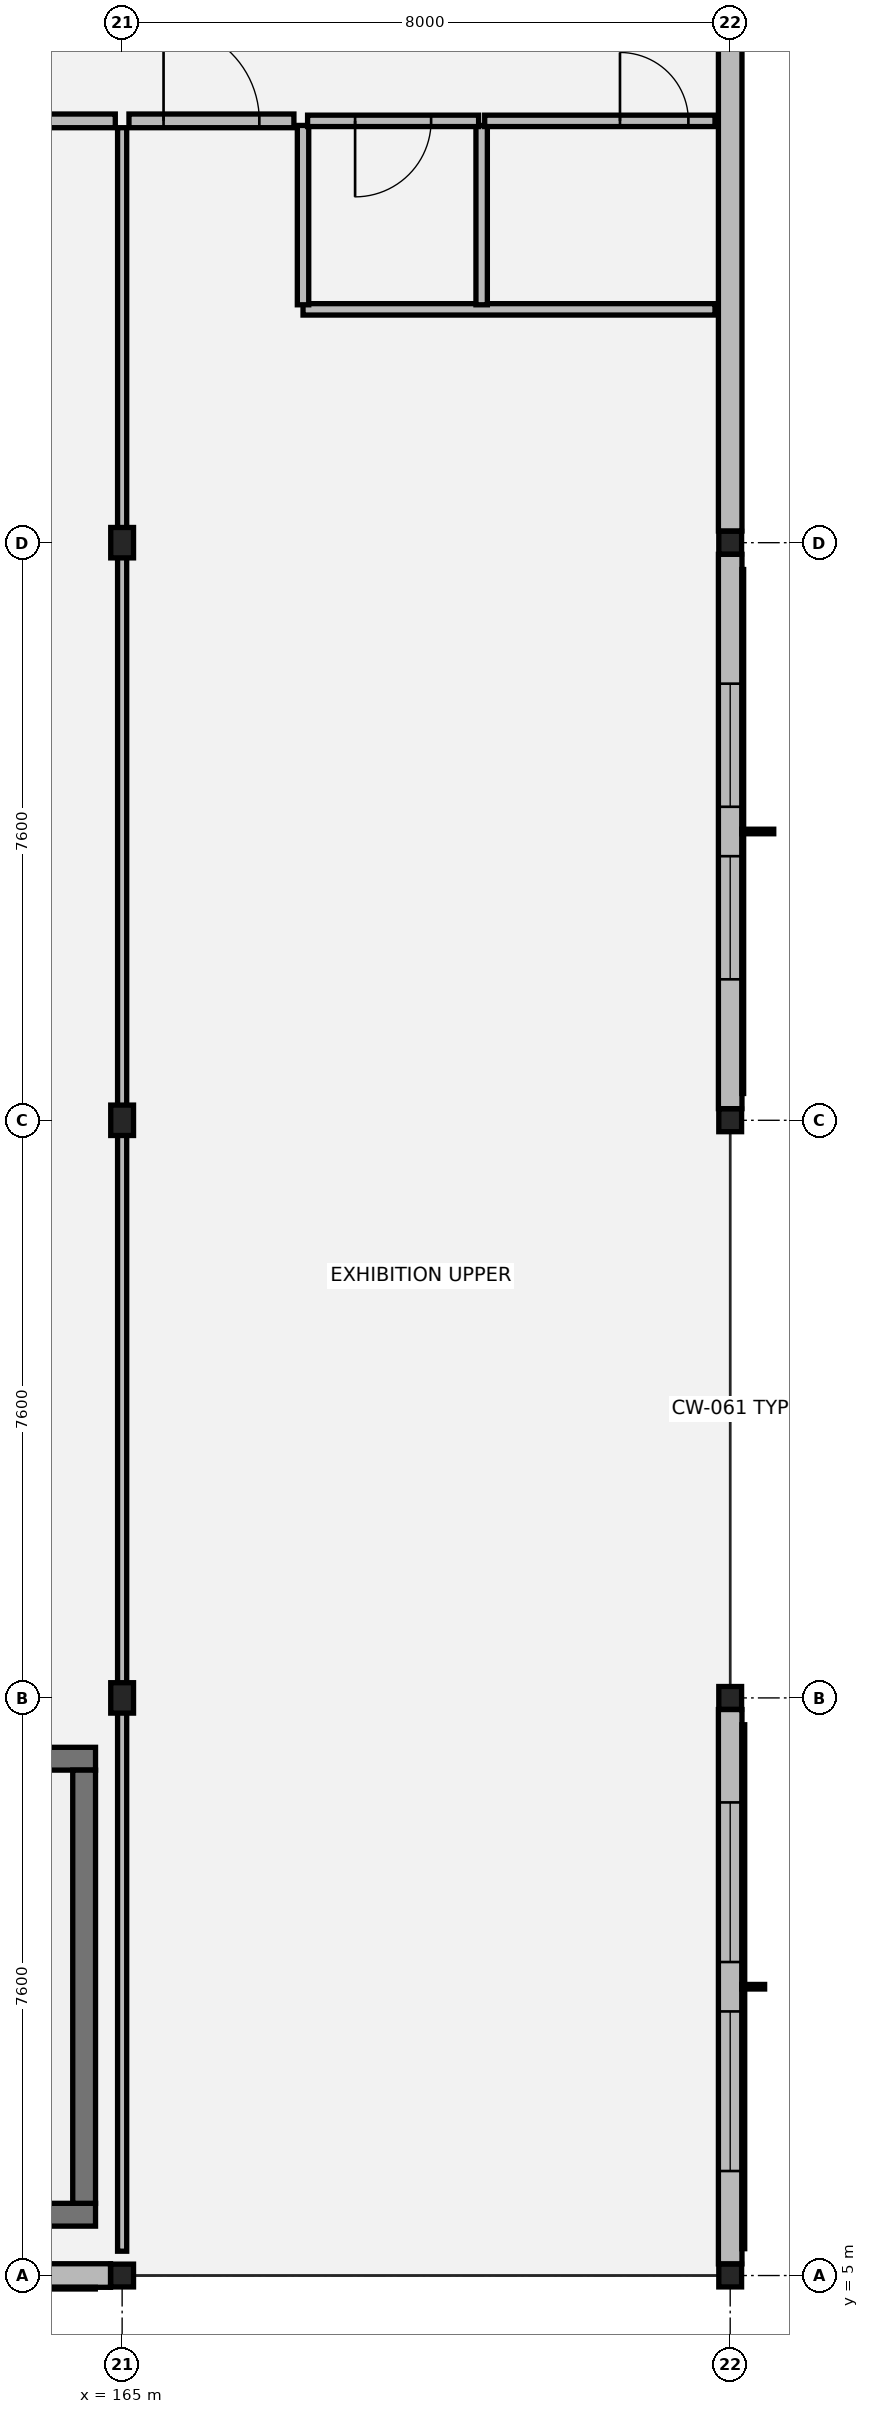
"""IFC4 building model, lengths in metres.
Left out: names, types, materials, properties, quantities, classifications, styles, units other than length and angle.
Written with IfcOpenShell. Run it as: python <this file> out.ifc"""

import sys

from ifc_helpers import new_model, si_unit, direction, frame, frame_2d, origin, origin_2d, place, context, subcontext, project, spatial, rectangle, hollow_rectangle, i_section, extrude, element, fill, save


model = new_model("IFC4")
c1 = context("Model", 3, precision=1e-05, world=origin(), true_north=direction((0.0, 1.0)))
c2 = subcontext(c1, "Body", "Model", "MODEL_VIEW")
j1 = project(units=[si_unit("LENGTHUNIT", "METRE"), si_unit("PLANEANGLEUNIT", "RADIAN")], contexts=[c1])
p1 = place(None, origin())
s1 = spatial("IfcSite", under=j1, at=p1, CompositionType="ELEMENT")
p2 = place(p1, origin())
s2 = spatial("IfcBuilding", under=s1, at=p2, CompositionType="ELEMENT")
p3 = place(p2, frame((0.0, 0.0, 5.1)))
s3 = spatial("IfcBuildingStorey", under=s2, at=p3, CompositionType="ELEMENT", Elevation=5.1)
p4 = place(p3, frame((165.0, 5.0, 0.0), z_axis=(0.0, 0.0, 1.0), x_axis=(1.0, 0.0, 0.0)))
e1 = element("IfcColumn", 1, at=p4, inside=s3, PredefinedType="COLUMN", context=c2, shape_type="SweptSolid", body=[
    extrude(hollow_rectangle(XDim=0.3, YDim=0.3, WallThickness=0.012, at=origin_2d()), origin(), (0.0, 0.0, 1.0), 4.055),
])
for number, where, z_axis, x_axis in (
    (2, (165.0, 12.6, 0.0), (0.0, 0.0, 1.0), (1.0, 0.0, 0.0)),
    (3, (165.0, 20.2, 0.0), (0.0, 0.0, 1.0), (1.0, 0.0, 0.0)),
    (4, (165.0, 27.8, 0.0), (0.0, 0.0, 1.0), (1.0, 0.0, 0.0)),
):
    element("IfcColumn", number, at=place(p3, frame(where, z_axis=z_axis, x_axis=x_axis)), inside=s3, PredefinedType="COLUMN", context=c2, shape_type="SweptSolid", body=[
        extrude(i_section(OverallWidth=0.3, OverallDepth=0.4, WebThickness=0.013, FlangeThickness=0.024, at=origin_2d()), origin(), (0.0, 0.0, 1.0), 4.055),
    ])
for number, where, z_axis, x_axis in (
    (5, (173.0, 5.0, 0.0), (0.0, 0.0, 1.0), (1.0, 0.0, 0.0)),
    (6, (173.0, 12.6, 0.0), (0.0, 0.0, 1.0), (1.0, 0.0, 0.0)),
    (7, (173.0, 20.2, 0.0), (0.0, 0.0, 1.0), (1.0, 0.0, 0.0)),
    (8, (173.0, 27.8, 0.0), (0.0, 0.0, 1.0), (1.0, 0.0, 0.0)),
):
    element("IfcColumn", number, at=place(p3, frame(where, z_axis=z_axis, x_axis=x_axis)), inside=s3, PredefinedType="COLUMN", context=c2, shape_type="SweptSolid", body=[
        extrude(hollow_rectangle(XDim=0.3, YDim=0.3, WallThickness=0.012, at=origin_2d()), origin(), (0.0, 0.0, 1.0), 4.055),
    ])
p5 = place(p3, frame((157.153, 5.0, 0.0), z_axis=(0.0, 0.0, 1.0), x_axis=(1.0, 0.0, 0.0)))
e9 = element("IfcWall", 9, at=p5, inside=s3, PredefinedType="SOLIDWALL", context=c2, shape_type="SweptSolid", body=[
    extrude(rectangle(XDim=7.694, YDim=0.31, at=frame_2d((3.847, 0.0))), origin(), (0.0, 0.0, 1.0), 3.48),
])
p6 = place(p5, frame((1.902, 0.0, 0.8)))
e10 = element("IfcOpeningElement", 10, at=p6, cuts=e9, PredefinedType="OPENING", context=c2, shape_type="SweptSolid", body=[
    extrude(rectangle(XDim=1.62, YDim=2.06, at=frame_2d((0.81, 1.03))), frame((0.0, 0.165, 0.0), z_axis=(0.0, -1.0, 0.0), x_axis=(1.0, 0.0, 0.0)), (0.0, 0.0, 1.0), 0.33),
])
p7 = place(p5, frame((4.172, 0.0, 0.8)))
e11 = element("IfcOpeningElement", 11, at=p7, cuts=e9, PredefinedType="OPENING", context=c2, shape_type="SweptSolid", body=[
    extrude(rectangle(XDim=1.62, YDim=2.06, at=frame_2d((0.81, 1.03))), frame((0.0, 0.165, 0.0), z_axis=(0.0, -1.0, 0.0), x_axis=(1.0, 0.0, 0.0)), (0.0, 0.0, 1.0), 0.33),
])
p8 = place(p3, frame((173.0, 5.153, 0.0), z_axis=(0.0, 0.0, 1.0), x_axis=(0.0, 1.0, 0.0)))
e12 = element("IfcWall", 12, at=p8, inside=s3, PredefinedType="SOLIDWALL", context=c2, shape_type="SweptSolid", body=[
    extrude(rectangle(XDim=7.294, YDim=0.31, at=frame_2d((3.647, 0.0))), origin(), (0.0, 0.0, 1.0), 3.48),
])
p9 = place(p8, frame((1.222, 0.0, 0.8)))
e13 = element("IfcOpeningElement", 13, at=p9, cuts=e12, PredefinedType="OPENING", context=c2, shape_type="SweptSolid", body=[
    extrude(rectangle(XDim=2.1, YDim=2.25, at=frame_2d((1.05, 1.125))), frame((0.0, 0.165, 0.0), z_axis=(0.0, -1.0, 0.0), x_axis=(1.0, 0.0, 0.0)), (0.0, 0.0, 1.0), 0.33),
])
p10 = place(p8, frame((3.972, 0.0, 0.8)))
e14 = element("IfcOpeningElement", 14, at=p10, cuts=e12, PredefinedType="OPENING", context=c2, shape_type="SweptSolid", body=[
    extrude(rectangle(XDim=2.1, YDim=2.25, at=frame_2d((1.05, 1.125))), frame((0.0, 0.165, 0.0), z_axis=(0.0, -1.0, 0.0), x_axis=(1.0, 0.0, 0.0)), (0.0, 0.0, 1.0), 0.33),
])
p11 = place(p3, frame((173.0, 20.353, 0.0), z_axis=(0.0, 0.0, 1.0), x_axis=(0.0, 1.0, 0.0)))
e15 = element("IfcWall", 15, at=p11, inside=s3, PredefinedType="SOLIDWALL", context=c2, shape_type="SweptSolid", body=[
    extrude(rectangle(XDim=7.294, YDim=0.31, at=frame_2d((3.647, 0.0))), origin(), (0.0, 0.0, 1.0), 3.48),
])
p12 = place(p11, frame((1.702, 0.0, 0.8)))
e16 = element("IfcOpeningElement", 16, at=p12, cuts=e15, PredefinedType="OPENING", context=c2, shape_type="SweptSolid", body=[
    extrude(rectangle(XDim=1.62, YDim=2.06, at=frame_2d((0.81, 1.03))), frame((0.0, 0.165, 0.0), z_axis=(0.0, -1.0, 0.0), x_axis=(1.0, 0.0, 0.0)), (0.0, 0.0, 1.0), 0.33),
])
p13 = place(p11, frame((3.972, 0.0, 0.8)))
e17 = element("IfcOpeningElement", 17, at=p13, cuts=e15, PredefinedType="OPENING", context=c2, shape_type="SweptSolid", body=[
    extrude(rectangle(XDim=1.62, YDim=2.06, at=frame_2d((0.81, 1.03))), frame((0.0, 0.165, 0.0), z_axis=(0.0, -1.0, 0.0), x_axis=(1.0, 0.0, 0.0)), (0.0, 0.0, 1.0), 0.33),
])
p14 = place(p3, frame((173.0, 27.953, 0.0), z_axis=(0.0, 0.0, 1.0), x_axis=(0.0, 1.0, 0.0)))
e18 = element("IfcWall", 18, at=p14, inside=s3, PredefinedType="SOLIDWALL", context=c2, shape_type="SweptSolid", body=[
    extrude(rectangle(XDim=7.294, YDim=0.31, at=frame_2d((3.647, 0.0))), origin(), (0.0, 0.0, 1.0), 3.48),
])
p15 = place(p3, frame((157.35, 5.8, 0.0), z_axis=(0.0, 0.0, 1.0), x_axis=(1.0, 0.0, 0.0)))
e19 = element("IfcWall", 19, at=p15, inside=s3, PredefinedType="SHEAR", context=c2, shape_type="SweptSolid", body=[
    extrude(rectangle(XDim=7.3, YDim=0.3, at=frame_2d((3.65, 0.0))), origin(), (0.0, 0.0, 1.0), 3.845),
])
p16 = place(p3, frame((157.35, 11.8, 0.0), z_axis=(0.0, 0.0, 1.0), x_axis=(1.0, 0.0, 0.0)))
e20 = element("IfcWall", 20, at=p16, inside=s3, PredefinedType="SHEAR", context=c2, shape_type="SweptSolid", body=[
    extrude(rectangle(XDim=7.3, YDim=0.3, at=frame_2d((3.65, 0.0))), origin(), (0.0, 0.0, 1.0), 3.845),
])
p17 = place(p16, frame((0.33, 0.0, 0.0)))
e21 = element("IfcOpeningElement", 21, at=p17, cuts=e20, PredefinedType="OPENING", context=c2, shape_type="SweptSolid", body=[
    extrude(rectangle(XDim=1.18, YDim=2.18, at=frame_2d((0.59, 1.09))), frame((0.0, 0.16, 0.0), z_axis=(0.0, -1.0, 0.0), x_axis=(1.0, 0.0, 0.0)), (0.0, 0.0, 1.0), 0.32),
])
p18 = place(p3, frame((164.5, 5.95, 0.0), z_axis=(0.0, 0.0, 1.0), x_axis=(0.0, 1.0, 0.0)))
e22 = element("IfcWall", 22, at=p18, inside=s3, PredefinedType="SHEAR", context=c2, shape_type="SweptSolid", body=[
    extrude(rectangle(XDim=5.7, YDim=0.3, at=frame_2d((2.85, 0.0))), origin(), (0.0, 0.0, 1.0), 3.845),
])
p19 = place(p3, frame((167.38, 30.87, 0.0), z_axis=(0.0, 0.0, 1.0), x_axis=(1.0, 0.0, 0.0)))
e23 = element("IfcWall", 23, at=p19, inside=s3, PredefinedType="PARTITIONING", context=c2, shape_type="SweptSolid", body=[
    extrude(rectangle(XDim=5.42, YDim=0.15, at=frame_2d((2.71, 0.0))), origin(), (0.0, 0.0, 1.0), 3.18),
])
for number, where, z_axis, x_axis in (
    (24, (167.38, 30.93, 0.0), (0.0, 0.0, 1.0), (0.0, 1.0, 0.0)),
    (25, (169.73, 30.93, 0.0), (0.0, 0.0, 1.0), (0.0, 1.0, 0.0)),
):
    element("IfcWall", number, at=place(p3, frame(where, z_axis=z_axis, x_axis=x_axis)), inside=s3, PredefinedType="PARTITIONING", context=c2, shape_type="SweptSolid", body=[
        extrude(rectangle(XDim=2.36, YDim=0.15, at=frame_2d((1.18, 0.0))), origin(), (0.0, 0.0, 1.0), 3.18),
    ])
p20 = place(p3, frame((167.44, 33.35, 0.0), z_axis=(0.0, 0.0, 1.0), x_axis=(1.0, 0.0, 0.0)))
e26 = element("IfcWall", 26, at=p20, inside=s3, PredefinedType="PARTITIONING", context=c2, shape_type="SweptSolid", body=[
    extrude(rectangle(XDim=2.25, YDim=0.15, at=frame_2d((1.125, 0.0))), origin(), (0.0, 0.0, 1.0), 3.18),
])
p21 = place(p20, frame((0.625, 0.0, 0.0)))
e27 = element("IfcOpeningElement", 27, at=p21, cuts=e26, PredefinedType="OPENING", context=c2, shape_type="SweptSolid", body=[
    extrude(rectangle(XDim=1.0, YDim=2.15, at=frame_2d((0.5, 1.075))), frame((0.0, 0.085, 0.0), z_axis=(0.0, -1.0, 0.0), x_axis=(1.0, 0.0, 0.0)), (0.0, 0.0, 1.0), 0.17),
])
p22 = place(p3, frame((169.77, 33.35, 0.0), z_axis=(0.0, 0.0, 1.0), x_axis=(1.0, 0.0, 0.0)))
e28 = element("IfcWall", 28, at=p22, inside=s3, PredefinedType="PARTITIONING", context=c2, shape_type="SweptSolid", body=[
    extrude(rectangle(XDim=3.03, YDim=0.15, at=frame_2d((1.515, 0.0))), origin(), (0.0, 0.0, 1.0), 3.18),
])
p23 = place(p22, frame((1.78, 0.0, 0.0)))
e29 = element("IfcOpeningElement", 29, at=p23, cuts=e28, PredefinedType="OPENING", context=c2, shape_type="SweptSolid", body=[
    extrude(rectangle(XDim=0.9, YDim=2.15, at=frame_2d((0.45, 1.075))), frame((0.0, 0.085, 0.0), z_axis=(0.0, -1.0, 0.0), x_axis=(1.0, 0.0, 0.0)), (0.0, 0.0, 1.0), 0.17),
])
p24 = place(p3, frame((159.85, 33.35, 0.0), z_axis=(0.0, 0.0, 1.0), x_axis=(1.0, 0.0, 0.0)))
e30 = element("IfcWall", 30, at=p24, inside=s3, PredefinedType="PARTITIONING", context=c2, shape_type="SweptSolid", body=[
    extrude(rectangle(XDim=5.06, YDim=0.18, at=frame_2d((2.53, 0.0))), origin(), (0.0, 0.0, 1.0), 3.18),
])
p25 = place(p3, frame((165.09, 33.35, 0.0), z_axis=(0.0, 0.0, 1.0), x_axis=(1.0, 0.0, 0.0)))
e31 = element("IfcWall", 31, at=p25, inside=s3, PredefinedType="PARTITIONING", context=c2, shape_type="SweptSolid", body=[
    extrude(rectangle(XDim=2.17, YDim=0.18, at=frame_2d((1.085, 0.0))), origin(), (0.0, 0.0, 1.0), 3.18),
])
p26 = place(p25, frame((0.455, 0.0, 0.0)))
e32 = element("IfcOpeningElement", 32, at=p26, cuts=e31, PredefinedType="OPENING", context=c2, shape_type="SweptSolid", body=[
    extrude(rectangle(XDim=1.26, YDim=2.2, at=frame_2d((0.63, 1.1))), frame((0.0, 0.1, 0.0), z_axis=(0.0, -1.0, 0.0), x_axis=(1.0, 0.0, 0.0)), (0.0, 0.0, 1.0), 0.2),
])
p27 = place(p3, frame((165.0, 5.32, 0.0), z_axis=(0.0, 0.0, 1.0), x_axis=(0.0, 1.0, 0.0)))
e33 = element("IfcWall", 33, at=p27, inside=s3, PredefinedType="PARTITIONING", context=c2, shape_type="SweptSolid", body=[
    extrude(rectangle(XDim=27.94, YDim=0.12, at=frame_2d((13.97, 0.0))), origin(), (0.0, 0.0, 1.0), 3.18),
])
p28 = place(p9, origin())
e34 = element("IfcWindow", 34, at=p28, inside=s3, PartitioningType="SINGLE_PANEL", PredefinedType="WINDOW", context=c2, shape_type="SweptSolid", body=[
    extrude(rectangle(XDim=2.1, YDim=2.25, at=frame_2d((1.05, 1.125))), frame((0.0, 0.03, 0.0), z_axis=(0.0, -1.0, 0.0), x_axis=(1.0, 0.0, 0.0)), (0.0, 0.0, 1.0), 0.06),
])
fill(e13, e34)
p29 = place(p10, origin())
e35 = element("IfcWindow", 35, at=p29, inside=s3, PartitioningType="SINGLE_PANEL", PredefinedType="WINDOW", context=c2, shape_type="SweptSolid", body=[
    extrude(rectangle(XDim=2.1, YDim=2.25, at=frame_2d((1.05, 1.125))), frame((0.0, 0.03, 0.0), z_axis=(0.0, -1.0, 0.0), x_axis=(1.0, 0.0, 0.0)), (0.0, 0.0, 1.0), 0.06),
])
fill(e14, e35)
p30 = place(p12, origin())
e36 = element("IfcWindow", 36, at=p30, inside=s3, PartitioningType="SINGLE_PANEL", PredefinedType="WINDOW", context=c2, shape_type="SweptSolid", body=[
    extrude(rectangle(XDim=1.62, YDim=2.06, at=frame_2d((0.81, 1.03))), frame((0.0, 0.03, 0.0), z_axis=(0.0, -1.0, 0.0), x_axis=(1.0, 0.0, 0.0)), (0.0, 0.0, 1.0), 0.06),
])
fill(e16, e36)
p31 = place(p13, origin())
e37 = element("IfcWindow", 37, at=p31, inside=s3, PartitioningType="SINGLE_PANEL", PredefinedType="WINDOW", context=c2, shape_type="SweptSolid", body=[
    extrude(rectangle(XDim=1.62, YDim=2.06, at=frame_2d((0.81, 1.03))), frame((0.0, 0.03, 0.0), z_axis=(0.0, -1.0, 0.0), x_axis=(1.0, 0.0, 0.0)), (0.0, 0.0, 1.0), 0.06),
])
fill(e17, e37)
p32 = place(p21, origin())
e38 = element("IfcDoor", 38, at=p32, inside=s3, OperationType="SINGLE_SWING_RIGHT", PredefinedType="DOOR", context=c2, shape_type="SweptSolid", body=[
    extrude(rectangle(XDim=1.0, YDim=2.15, at=frame_2d((0.5, 1.075))), frame((0.0, 0.025, 0.0), z_axis=(0.0, -1.0, 0.0), x_axis=(1.0, 0.0, 0.0)), (0.0, 0.0, 1.0), 0.05),
])
fill(e27, e38)
p33 = place(p23, origin())
e39 = element("IfcDoor", 39, at=p33, inside=s3, OperationType="SINGLE_SWING_LEFT", PredefinedType="DOOR", context=c2, shape_type="SweptSolid", body=[
    extrude(rectangle(XDim=0.9, YDim=2.15, at=frame_2d((0.45, 1.075))), frame((0.0, 0.025, 0.0), z_axis=(0.0, -1.0, 0.0), x_axis=(1.0, 0.0, 0.0)), (0.0, 0.0, 1.0), 0.05),
])
fill(e29, e39)
p34 = place(p26, origin())
e40 = element("IfcDoor", 40, at=p34, inside=s3, OperationType="SINGLE_SWING_LEFT", PredefinedType="DOOR", context=c2, shape_type="SweptSolid", body=[
    extrude(rectangle(XDim=1.26, YDim=2.2, at=frame_2d((0.63, 1.1))), frame((0.0, 0.025, 0.0), z_axis=(0.0, -1.0, 0.0), x_axis=(1.0, 0.0, 0.0)), (0.0, 0.0, 1.0), 0.05),
])
fill(e32, e40)
save(model, sys.argv[1])
